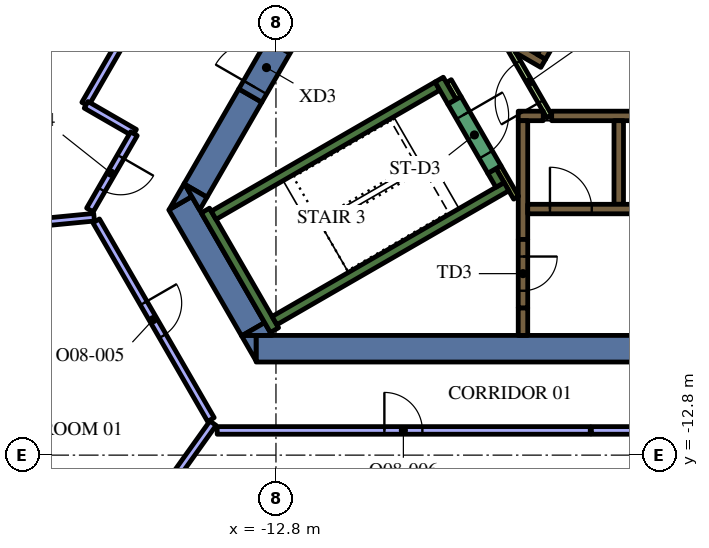
"""IFC4 building model, lengths in metres.
Left out: names, types, materials, properties, quantities, classifications, styles, units other than length and angle.
Written with IfcOpenShell. Run it as: python <this file> out.ifc"""

import sys

from ifc_helpers import new_model, si_unit, direction, frame, frame_2d, origin, place, context, subcontext, project, spatial, polyline, rectangle, outline, extrude, element, fill, save


model = new_model("IFC4")
c1 = context("Model", 3, precision=1e-05, world=origin(), true_north=direction((0.0, 1.0)))
c2 = subcontext(c1, "Body", "Model", "MODEL_VIEW")
j1 = project(units=[si_unit("LENGTHUNIT", "METRE"), si_unit("PLANEANGLEUNIT", "RADIAN")], contexts=[c1])
p1 = place(None, origin())
s1 = spatial("IfcSite", under=j1, at=p1, CompositionType="ELEMENT")
p2 = place(p1, origin())
s2 = spatial("IfcBuilding", under=s1, at=p2, CompositionType="ELEMENT")
p3 = place(p2, frame((0.0, 0.0, 235.2)))
s3 = spatial("IfcBuildingStorey", under=s2, at=p3, CompositionType="ELEMENT", Elevation=235.2)
p4 = place(p3, frame((8.904, -10.0, 0.0), z_axis=(0.0, 0.0, 1.0), x_axis=(-1.0, 0.0, 0.0)))
e1 = element("IfcWall", 1, at=p4, inside=s3, PredefinedType="SOLIDWALL", context=c2, shape_type="SweptSolid", body=[
    extrude(rectangle(XDim=22.226, YDim=0.7, at=frame_2d((11.113, 0.0))), origin(), (0.0, 0.0, 1.0), 4.2),
])
p5 = place(p3, origin())
e2 = element("IfcWall", 2, at=p5, inside=s3, PredefinedType="SOLIDWALL", context=c2, shape_type="SweptSolid", body=[
    extrude(outline(polyline([(-13.712, -9.65), (-13.324, -9.65), (-13.324, -10.322), (-13.712, -9.65)])), origin(), (0.0, 0.0, 1.0), 4.2),
])
p6 = place(p3, frame((-13.402, -9.487, 0.0), z_axis=(0.0, 0.0, 1.0), x_axis=(-0.500020498207, 0.866013568815, 0.0)))
e3 = element("IfcWall", 3, at=p6, inside=s3, PredefinedType="SOLIDWALL", context=c2, shape_type="SweptSolid", body=[
    extrude(rectangle(XDim=3.829, YDim=0.7, at=frame_2d((1.915, 0.0))), origin(), (0.0, 0.0, 1.0), 4.2),
])
e4 = element("IfcWall", 4, at=p5, inside=s3, PredefinedType="SOLIDWALL", context=c2, shape_type="SweptSolid", body=[
    extrude(outline(polyline([(-15.014, -5.995), (-15.611, -6.339), (-15.213, -5.65), (-15.014, -5.995)])), origin(), (0.0, 0.0, 1.0), 4.2),
])
e5 = element("IfcWall", 5, at=p5, inside=s3, PredefinedType="SOLIDWALL", context=c2, shape_type="SweptSolid", body=[
    extrude(outline(polyline([(-12.904, -9.65), (-13.68, -9.65), (-13.098, -9.314), (-12.904, -9.65)])), origin(), (0.0, 0.0, 1.0), 4.2),
])
p7 = place(p3, frame((-13.475, -3.339, 0.0), z_axis=(0.0, 0.0, 1.0), x_axis=(-0.499944726303, -0.866057313716, 0.0)))
e6 = element("IfcWall", 6, at=p7, inside=s3, PredefinedType="SOLIDWALL", context=c2, shape_type="SweptSolid", body=[
    extrude(rectangle(XDim=2.884, YDim=0.7, at=frame_2d((1.442, 0.0))), origin(), (0.0, 0.0, 1.0), 4.2),
])
e7 = element("IfcWall", 7, at=p5, inside=s3, PredefinedType="SOLIDWALL", context=c2, shape_type="SweptSolid", body=[
    extrude(outline(polyline([(-14.809, -6.35), (-15.197, -5.678), (-14.615, -6.014), (-14.809, -6.35)])), origin(), (0.0, 0.0, 1.0), 4.2),
])
p8 = place(p3, frame((-12.84, -9.511, 0.0), z_axis=(0.0, 0.0, 1.0), x_axis=(-0.499997733992, 0.866026712061, 0.0)))
e8 = element("IfcWall", 8, at=p8, inside=s3, PredefinedType="SOLIDWALL", context=c2, shape_type="SweptSolid", body=[
    extrude(rectangle(XDim=3.634, YDim=0.25, at=frame_2d((1.817, 0.0))), origin(), (0.0, 0.0, 1.0), 4.2),
])
p9 = place(p3, frame((-14.44, -6.49, 0.0), z_axis=(0.0, 0.0, 1.0), x_axis=(0.866022966069, 0.500004222222, 0.0)))
e9 = element("IfcWall", 9, at=p9, inside=s3, PredefinedType="SOLIDWALL", context=c2, shape_type="SweptSolid", body=[
    extrude(rectangle(XDim=6.8, YDim=0.25, at=frame_2d((3.4, 0.0))), origin(), (0.0, 0.0, 1.0), 4.2),
])
p10 = place(p3, frame((-8.168, -3.503, 0.0), z_axis=(0.0, 0.0, 1.0), x_axis=(-0.499952099219, 0.866053057547, 0.0)))
e10 = element("IfcWall", 10, at=p10, inside=s3, PredefinedType="SOLIDWALL", context=c2, shape_type="SweptSolid", body=[
    extrude(rectangle(XDim=0.675, YDim=0.25, at=frame_2d((0.337, 0.0))), origin(), (0.0, 0.0, 1.0), 4.2),
])
p11 = place(p3, frame((-12.84, -9.261, 0.0), z_axis=(0.0, 0.0, 1.0), x_axis=(0.866016039709, 0.500016218704, 0.0)))
e11 = element("IfcWall", 11, at=p11, inside=s3, PredefinedType="SOLIDWALL", context=c2, shape_type="SweptSolid", body=[
    extrude(rectangle(XDim=7.05, YDim=0.25, at=frame_2d((3.525, 0.0))), origin(), (0.0, 0.0, 1.0), 4.2),
])
p12 = place(p3, frame((-6.905, -5.69, 0.0), z_axis=(0.0, 0.0, 1.0), x_axis=(-0.500402024738, 0.865793170242, 0.0)))
e12 = element("IfcWall", 12, at=p12, inside=s3, PredefinedType="SOLIDWALL", context=c2, shape_type="SweptSolid", body=[
    extrude(rectangle(XDim=0.425, YDim=0.25, at=frame_2d((0.212, 0.0))), origin(), (0.0, 0.0, 1.0), 4.2),
])
p13 = place(p3, frame((-6.3, -8.925, 0.0), z_axis=(0.0, 0.0, 1.0), x_axis=(0.0, -1.0, 0.0)))
e13 = element("IfcWall", 13, at=p13, inside=s3, PredefinedType="SOLIDWALL", context=c2, shape_type="SweptSolid", body=[
    extrude(rectangle(XDim=0.725, YDim=0.25, at=frame_2d((0.363, 0.0))), origin(), (0.0, 0.0, 1.0), 4.2),
])
p14 = place(p3, frame((-5.545, -3.875, 0.0), z_axis=(0.0, 0.0, 1.0), x_axis=(1.0, 0.0, 0.0)))
e14 = element("IfcWall", 14, at=p14, inside=s3, PredefinedType="SOLIDWALL", context=c2, shape_type="SweptSolid", body=[
    extrude(rectangle(XDim=11.97, YDim=0.25, at=frame_2d((5.985, 0.0))), origin(), (0.0, 0.0, 1.0), 4.2),
])
p15 = place(p3, frame((-6.425, -3.875, 0.0), z_axis=(0.0, 0.0, 1.0), x_axis=(1.0, 0.0, 0.0)))
e15 = element("IfcWall", 15, at=p15, inside=s3, PredefinedType="SOLIDWALL", context=c2, shape_type="SweptSolid", body=[
    extrude(rectangle(XDim=0.658, YDim=0.25, at=frame_2d((0.329, 0.0))), origin(), (0.0, 0.0, 1.0), 4.2),
])
p16 = place(p3, frame((-3.78, -4.0, 0.0), z_axis=(0.0, 0.0, 1.0), x_axis=(0.0, -1.0, 0.0)))
e16 = element("IfcWall", 16, at=p16, inside=s3, PredefinedType="SOLIDWALL", context=c2, shape_type="SweptSolid", body=[
    extrude(rectangle(XDim=2.2, YDim=0.25, at=frame_2d((1.1, 0.0))), origin(), (0.0, 0.0, 1.0), 4.2),
])
p17 = place(p3, frame((-6.3, -7.125, 0.0), z_axis=(0.0, 0.0, 1.0), x_axis=(0.0, 1.0, 0.0)))
e17 = element("IfcWall", 17, at=p17, inside=s3, PredefinedType="SOLIDWALL", context=c2, shape_type="SweptSolid", body=[
    extrude(rectangle(XDim=3.125, YDim=0.25, at=frame_2d((1.562, 0.0))), origin(), (0.0, 0.0, 1.0), 4.2),
])
e18 = element("IfcWall", 18, at=p5, inside=s3, PredefinedType="SOLIDWALL", context=c2, shape_type="SweptSolid", body=[
    extrude(outline(polyline([(-5.922, -2.257), (-5.922, -2.257), (-5.705, -2.382), (-5.83, -2.598), (-6.483, -2.221), (-6.591, -2.033), (-6.591, -2.033), (-6.7, -2.096), (-7.952, -1.373), (-7.827, -1.156), (-5.922, -2.257)])), origin(), (0.0, 0.0, 1.0), 4.2),
])
p18 = place(p3, frame((-8.252, -2.958, 0.0), z_axis=(0.0, 0.0, 1.0), x_axis=(0.500174715838, -0.865924508047, 0.0)))
e19 = element("IfcWall", 19, at=p18, inside=s3, PredefinedType="PARTITIONING", context=c2, shape_type="SweptSolid", body=[
    extrude(rectangle(XDim=0.514, YDim=0.15, at=frame_2d((0.257, 0.0))), origin(), (0.0, 0.0, 1.0), 3.45),
])
p19 = place(p3, frame((-6.48, -6.027, 0.0), z_axis=(0.0, 0.0, 1.0), x_axis=(-0.499927229454, 0.866067413802, 0.0)))
e20 = element("IfcWall", 20, at=p19, inside=s3, PredefinedType="PARTITIONING", context=c2, shape_type="SweptSolid", body=[
    extrude(rectangle(XDim=0.929, YDim=0.15, at=frame_2d((0.464, 0.0))), origin(), (0.0, 0.0, 1.0), 4.2),
])
p20 = place(p3, frame((-6.175, -6.325, 0.0), z_axis=(0.0, 0.0, 1.0), x_axis=(1.0, 0.0, 0.0)))
e21 = element("IfcWall", 21, at=p20, inside=s3, PredefinedType="SOLIDWALL", context=c2, shape_type="SweptSolid", body=[
    extrude(rectangle(XDim=12.35, YDim=0.25, at=frame_2d((6.175, 0.0))), origin(), (0.0, 0.0, 1.0), 4.2),
])
p21 = place(p20, frame((0.585, 0.0, 0.0)))
e22 = element("IfcOpeningElement", 22, at=p21, cuts=e21, PredefinedType="OPENING", context=c2, shape_type="SweptSolid", body=[
    extrude(rectangle(XDim=1.1, YDim=2.1, at=frame_2d((0.55, 1.05))), frame((0.0, 0.135, 0.0), z_axis=(0.0, -1.0, 0.0), x_axis=(1.0, 0.0, 0.0)), (0.0, 0.0, 1.0), 0.27),
])
p22 = place(p20, frame((3.105, 0.0, 0.0)))
e23 = element("IfcOpeningElement", 23, at=p22, cuts=e21, PredefinedType="OPENING", context=c2, shape_type="SweptSolid", body=[
    extrude(rectangle(XDim=1.1, YDim=2.1, at=frame_2d((0.55, 1.05))), frame((0.0, 0.135, 0.0), z_axis=(0.0, -1.0, 0.0), x_axis=(1.0, 0.0, 0.0)), (0.0, 0.0, 1.0), 0.27),
])
p23 = place(p20, frame((5.625, 0.0, 0.0)))
e24 = element("IfcOpeningElement", 24, at=p23, cuts=e21, PredefinedType="OPENING", context=c2, shape_type="SweptSolid", body=[
    extrude(rectangle(XDim=1.1, YDim=2.1, at=frame_2d((0.55, 1.05))), frame((0.0, 0.135, 0.0), z_axis=(0.0, -1.0, 0.0), x_axis=(1.0, 0.0, 0.0)), (0.0, 0.0, 1.0), 0.27),
])
p24 = place(p20, frame((8.145, 0.0, 0.0)))
e25 = element("IfcOpeningElement", 25, at=p24, cuts=e21, PredefinedType="OPENING", context=c2, shape_type="SweptSolid", body=[
    extrude(rectangle(XDim=1.1, YDim=2.1, at=frame_2d((0.55, 1.05))), frame((0.0, 0.135, 0.0), z_axis=(0.0, -1.0, 0.0), x_axis=(1.0, 0.0, 0.0)), (0.0, 0.0, 1.0), 0.27),
])
p25 = place(p20, frame((10.665, 0.0, 0.0)))
e26 = element("IfcOpeningElement", 26, at=p25, cuts=e21, PredefinedType="OPENING", context=c2, shape_type="SweptSolid", body=[
    extrude(rectangle(XDim=1.1, YDim=2.1, at=frame_2d((0.55, 1.05))), frame((0.0, 0.135, 0.0), z_axis=(0.0, -1.0, 0.0), x_axis=(1.0, 0.0, 0.0)), (0.0, 0.0, 1.0), 0.27),
])
p26 = place(p3, frame((-0.898, 6.194, 0.0), z_axis=(0.0, 0.0, 1.0), x_axis=(-0.499996202215, -0.866027596426, 0.0)))
e27 = element("IfcWall", 27, at=p26, inside=s3, PredefinedType="SOLIDWALL", context=c2, shape_type="SweptSolid", body=[
    extrude(rectangle(XDim=9.83, YDim=0.25, at=frame_2d((4.915, 0.0))), origin(), (0.0, 0.0, 1.0), 4.2),
])
p27 = place(p26, frame((0.585, 0.0, 0.0)))
e28 = element("IfcOpeningElement", 28, at=p27, cuts=e27, PredefinedType="OPENING", context=c2, shape_type="SweptSolid", body=[
    extrude(rectangle(XDim=1.1, YDim=2.1, at=frame_2d((0.55, 1.05))), frame((0.0, 0.135, 0.0), z_axis=(0.0, -1.0, 0.0), x_axis=(1.0, 0.0, 0.0)), (0.0, 0.0, 1.0), 0.27),
])
p28 = place(p26, frame((3.105, 0.0, 0.0)))
e29 = element("IfcOpeningElement", 29, at=p28, cuts=e27, PredefinedType="OPENING", context=c2, shape_type="SweptSolid", body=[
    extrude(rectangle(XDim=1.1, YDim=2.1, at=frame_2d((0.55, 1.05))), frame((0.0, 0.135, 0.0), z_axis=(0.0, -1.0, 0.0), x_axis=(1.0, 0.0, 0.0)), (0.0, 0.0, 1.0), 0.27),
])
p29 = place(p26, frame((5.625, 0.0, 0.0)))
e30 = element("IfcOpeningElement", 30, at=p29, cuts=e27, PredefinedType="OPENING", context=c2, shape_type="SweptSolid", body=[
    extrude(rectangle(XDim=1.1, YDim=2.1, at=frame_2d((0.55, 1.05))), frame((0.0, 0.135, 0.0), z_axis=(0.0, -1.0, 0.0), x_axis=(1.0, 0.0, 0.0)), (0.0, 0.0, 1.0), 0.27),
])
p30 = place(p26, frame((8.145, 0.0, 0.0)))
e31 = element("IfcOpeningElement", 31, at=p30, cuts=e27, PredefinedType="OPENING", context=c2, shape_type="SweptSolid", body=[
    extrude(rectangle(XDim=1.1, YDim=2.1, at=frame_2d((0.55, 1.05))), frame((0.0, 0.135, 0.0), z_axis=(0.0, -1.0, 0.0), x_axis=(1.0, 0.0, 0.0)), (0.0, 0.0, 1.0), 0.27),
])
p31 = place(p3, frame((-8.103, -3.466, 0.0), z_axis=(0.0, 0.0, 1.0), x_axis=(0.500078061341, -0.865980330357, 0.0)))
e32 = element("IfcWall", 32, at=p31, inside=s3, PredefinedType="SOLIDWALL", context=c2, shape_type="SweptSolid", body=[
    extrude(rectangle(XDim=2.1, YDim=0.4, at=frame_2d((1.05, 0.0))), origin(), (0.0, 0.0, 1.0), 4.2),
])
p32 = place(p31, frame((0.45, 0.0, 0.0)))
e33 = element("IfcOpeningElement", 33, at=p32, cuts=e32, PredefinedType="OPENING", context=c2, shape_type="SweptSolid", body=[
    extrude(rectangle(XDim=1.2, YDim=2.1, at=frame_2d((0.6, 1.05))), frame((0.0, 0.21, 0.0), z_axis=(0.0, -1.0, 0.0), x_axis=(1.0, 0.0, 0.0)), (0.0, 0.0, 1.0), 0.42),
])
p33 = place(p3, frame((-6.3, -7.125, 0.0), z_axis=(0.0, 0.0, 1.0), x_axis=(0.0, -1.0, 0.0)))
e34 = element("IfcWall", 34, at=p33, inside=s3, PredefinedType="SOLIDWALL", context=c2, shape_type="SweptSolid", body=[
    extrude(rectangle(XDim=1.8, YDim=0.25, at=frame_2d((0.9, 0.0))), origin(), (0.0, 0.0, 1.0), 4.2),
])
p34 = place(p33, frame((0.45, 0.0, 0.0)))
e35 = element("IfcOpeningElement", 35, at=p34, cuts=e34, PredefinedType="OPENING", context=c2, shape_type="SweptSolid", body=[
    extrude(rectangle(XDim=0.9, YDim=2.1, at=frame_2d((0.45, 1.05))), frame((0.0, 0.135, 0.0), z_axis=(0.0, -1.0, 0.0), x_axis=(1.0, 0.0, 0.0)), (0.0, 0.0, 1.0), 0.27),
])
p35 = place(p3, frame((-5.606, -3.89, 0.0), z_axis=(0.0, 0.0, 1.0), x_axis=(-0.500027713859, 0.866009402589, 0.0)))
e36 = element("IfcWall", 36, at=p35, inside=s3, PredefinedType="PARTITIONING", context=c2, shape_type="SweptSolid", body=[
    extrude(rectangle(XDim=2.1, YDim=0.15, at=frame_2d((1.05, 0.0))), origin(), (0.0, 0.0, 1.0), 3.45),
])
p36 = place(p35, frame((0.45, 0.0, 0.0)))
e37 = element("IfcOpeningElement", 37, at=p36, cuts=e36, PredefinedType="OPENING", context=c2, shape_type="SweptSolid", body=[
    extrude(rectangle(XDim=1.2, YDim=2.1, at=frame_2d((0.6, 1.05))), frame((0.0, 0.085, 0.0), z_axis=(0.0, -1.0, 0.0), x_axis=(1.0, 0.0, 0.0)), (0.0, 0.0, 1.0), 0.17),
])
p37 = place(p3, frame((-13.475, -3.339, 0.0), z_axis=(0.0, 0.0, 1.0), x_axis=(0.499954529098, 0.86605165483, 0.0)))
e38 = element("IfcWall", 38, at=p37, inside=s3, PredefinedType="SOLIDWALL", context=c2, shape_type="SweptSolid", body=[
    extrude(rectangle(XDim=1.7, YDim=0.7, at=frame_2d((0.85, 0.0))), origin(), (0.0, 0.0, 1.0), 4.2),
])
p38 = place(p37, frame((0.25, 0.0, 0.0)))
e39 = element("IfcOpeningElement", 39, at=p38, cuts=e38, PredefinedType="OPENING", context=c2, shape_type="SweptSolid", body=[
    extrude(rectangle(XDim=1.2, YDim=2.1, at=frame_2d((0.6, 1.05))), frame((0.0, 0.36, 0.0), z_axis=(0.0, -1.0, 0.0), x_axis=(1.0, 0.0, 0.0)), (0.0, 0.0, 1.0), 0.72),
])
p39 = place(p3, frame((-17.586, -6.54, 0.0), z_axis=(0.0, 0.0, 1.0), x_axis=(-0.995357542522, -0.096246363795, 0.0)))
e40 = element("IfcWall", 40, at=p39, inside=s3, PredefinedType="PARTITIONING", context=c2, shape_type="SweptSolid", body=[
    extrude(rectangle(XDim=7.318, YDim=0.2, at=frame_2d((3.659, 0.0))), origin(), (0.0, 0.0, 1.0), 3.45),
])
p40 = place(p3, frame((-16.681, -1.593, 0.0), z_axis=(0.0, 0.0, 1.0), x_axis=(-0.499985038317, -0.866034041744, 0.0)))
e41 = element("IfcWall", 41, at=p40, inside=s3, PredefinedType="PARTITIONING", context=c2, shape_type="SweptSolid", body=[
    extrude(rectangle(XDim=2.28, YDim=0.2, at=frame_2d((1.14, 0.0))), origin(), (0.0, 0.0, 1.0), 3.45),
])
p41 = place(p3, frame((-17.795, -3.582, 0.0), z_axis=(0.0, 0.0, 1.0), x_axis=(0.866016893711, -0.50001473959, 0.0)))
e42 = element("IfcWall", 42, at=p41, inside=s3, PredefinedType="PARTITIONING", context=c2, shape_type="SweptSolid", body=[
    extrude(rectangle(XDim=1.47, YDim=0.2, at=frame_2d((0.735, 0.0))), origin(), (0.0, 0.0, 1.0), 3.45),
])
p42 = place(p3, frame((-16.537, -4.343, 0.0), z_axis=(0.0, 0.0, 1.0), x_axis=(-0.500014285048, -0.866017156151, 0.0)))
e43 = element("IfcWall", 43, at=p42, inside=s3, PredefinedType="PARTITIONING", context=c2, shape_type="SweptSolid", body=[
    extrude(rectangle(XDim=2.317, YDim=0.2, at=frame_2d((1.159, 0.0))), origin(), (0.0, 0.0, 1.0), 3.45),
])
p43 = place(p42, frame((0.7, 0.0, 0.0)))
e44 = element("IfcOpeningElement", 44, at=p43, cuts=e43, PredefinedType="OPENING", context=c2, shape_type="SweptSolid", body=[
    extrude(rectangle(XDim=1.0, YDim=2.1, at=frame_2d((0.5, 1.05))), frame((0.0, 0.11, 0.0), z_axis=(0.0, -1.0, 0.0), x_axis=(1.0, 0.0, 0.0)), (0.0, 0.0, 1.0), 0.22),
])
p44 = place(p3, frame((-14.457, -11.96, 0.0), z_axis=(0.0, 0.0, 1.0), x_axis=(-0.581023578026, -0.813886725397, 0.0)))
e45 = element("IfcWall", 45, at=p44, inside=s3, PredefinedType="PARTITIONING", context=c2, shape_type="SweptSolid", body=[
    extrude(rectangle(XDim=7.318, YDim=0.2, at=frame_2d((3.659, 0.0))), origin(), (0.0, 0.0, 1.0), 3.45),
])
p45 = place(p3, frame((-17.531, -6.635, 0.0), z_axis=(0.0, 0.0, 1.0), x_axis=(0.500009459589, -0.866019942219, 0.0)))
e46 = element("IfcWall", 46, at=p45, inside=s3, PredefinedType="PARTITIONING", context=c2, shape_type="SweptSolid", body=[
    extrude(rectangle(XDim=6.038, YDim=0.2, at=frame_2d((3.019, 0.0))), origin(), (0.0, 0.0, 1.0), 3.45),
])
p46 = place(p45, frame((2.5, 0.0, 0.0)))
e47 = element("IfcOpeningElement", 47, at=p46, cuts=e46, PredefinedType="OPENING", context=c2, shape_type="SweptSolid", body=[
    extrude(rectangle(XDim=1.0, YDim=2.1, at=frame_2d((0.5, 1.05))), frame((0.0, 0.11, 0.0), z_axis=(0.0, -1.0, 0.0), x_axis=(1.0, 0.0, 0.0)), (0.0, 0.0, 1.0), 0.22),
])
p47 = place(p3, frame((-4.5, -12.15, 0.0), z_axis=(0.0, 0.0, 1.0), x_axis=(1.0, 0.0, 0.0)))
e48 = element("IfcWall", 48, at=p47, inside=s3, PredefinedType="PARTITIONING", context=c2, shape_type="SweptSolid", body=[
    extrude(rectangle(XDim=9.0, YDim=0.2, at=frame_2d((4.5, 0.0))), origin(), (0.0, 0.0, 1.0), 3.45),
])
p48 = place(p3, frame((-14.347, -12.15, 0.0), z_axis=(0.0, 0.0, 1.0), x_axis=(1.0, 0.0, 0.0)))
e49 = element("IfcWall", 49, at=p48, inside=s3, PredefinedType="PARTITIONING", context=c2, shape_type="SweptSolid", body=[
    extrude(rectangle(XDim=9.817, YDim=0.2, at=frame_2d((4.909, 0.0))), origin(), (0.0, 0.0, 1.0), 3.45),
])
p49 = place(p48, frame((4.4, 0.0, 0.0)))
e50 = element("IfcOpeningElement", 50, at=p49, cuts=e49, PredefinedType="OPENING", context=c2, shape_type="SweptSolid", body=[
    extrude(rectangle(XDim=1.0, YDim=2.1, at=frame_2d((0.5, 1.05))), frame((0.0, 0.11, 0.0), z_axis=(0.0, -1.0, 0.0), x_axis=(1.0, 0.0, 0.0)), (0.0, 0.0, 1.0), 0.22),
])
p50 = place(p21, origin())
e51 = element("IfcDoor", 51, at=p50, inside=s3, OperationType="DOUBLE_DOOR_SLIDING", PredefinedType="DOOR", context=c2, shape_type="SweptSolid", body=[
    extrude(rectangle(XDim=1.1, YDim=2.1, at=frame_2d((0.55, 1.05))), frame((0.0, 0.025, 0.0), z_axis=(0.0, -1.0, 0.0), x_axis=(1.0, 0.0, 0.0)), (0.0, 0.0, 1.0), 0.05),
])
fill(e22, e51)
p51 = place(p32, origin())
e52 = element("IfcDoor", 52, at=p51, inside=s3, OperationType="SINGLE_SWING_LEFT", PredefinedType="DOOR", context=c2, shape_type="SweptSolid", body=[
    extrude(rectangle(XDim=1.2, YDim=2.1, at=frame_2d((0.6, 1.05))), frame((0.0, 0.025, 0.0), z_axis=(0.0, -1.0, 0.0), x_axis=(1.0, 0.0, 0.0)), (0.0, 0.0, 1.0), 0.05),
])
fill(e33, e52)
p52 = place(p34, origin())
e53 = element("IfcDoor", 53, at=p52, inside=s3, OperationType="SINGLE_SWING_LEFT", PredefinedType="DOOR", context=c2, shape_type="SweptSolid", body=[
    extrude(rectangle(XDim=0.9, YDim=2.1, at=frame_2d((0.45, 1.05))), frame((0.0, 0.025, 0.0), z_axis=(0.0, -1.0, 0.0), x_axis=(1.0, 0.0, 0.0)), (0.0, 0.0, 1.0), 0.05),
])
fill(e35, e53)
p53 = place(p36, origin())
e54 = element("IfcDoor", 54, at=p53, inside=s3, OperationType="SINGLE_SWING_LEFT", PredefinedType="DOOR", context=c2, shape_type="SweptSolid", body=[
    extrude(rectangle(XDim=1.2, YDim=2.1, at=frame_2d((0.6, 1.05))), frame((0.0, 0.025, 0.0), z_axis=(0.0, -1.0, 0.0), x_axis=(1.0, 0.0, 0.0)), (0.0, 0.0, 1.0), 0.05),
])
fill(e37, e54)
p54 = place(p38, origin())
e55 = element("IfcDoor", 55, at=p54, inside=s3, OperationType="SINGLE_SWING_LEFT", PredefinedType="DOOR", context=c2, shape_type="SweptSolid", body=[
    extrude(rectangle(XDim=1.2, YDim=2.1, at=frame_2d((0.6, 1.05))), frame((0.0, 0.025, 0.0), z_axis=(0.0, -1.0, 0.0), x_axis=(1.0, 0.0, 0.0)), (0.0, 0.0, 1.0), 0.05),
])
fill(e39, e55)
p55 = place(p43, origin())
e56 = element("IfcDoor", 56, at=p55, inside=s3, OperationType="SINGLE_SWING_RIGHT", PredefinedType="DOOR", context=c2, shape_type="SweptSolid", body=[
    extrude(rectangle(XDim=1.0, YDim=2.1, at=frame_2d((0.5, 1.05))), frame((0.0, 0.025, 0.0), z_axis=(0.0, -1.0, 0.0), x_axis=(1.0, 0.0, 0.0)), (0.0, 0.0, 1.0), 0.05),
])
fill(e44, e56)
p56 = place(p46, origin())
e57 = element("IfcDoor", 57, at=p56, inside=s3, OperationType="SINGLE_SWING_LEFT", PredefinedType="DOOR", context=c2, shape_type="SweptSolid", body=[
    extrude(rectangle(XDim=1.0, YDim=2.1, at=frame_2d((0.5, 1.05))), frame((0.0, 0.025, 0.0), z_axis=(0.0, -1.0, 0.0), x_axis=(1.0, 0.0, 0.0)), (0.0, 0.0, 1.0), 0.05),
])
fill(e47, e57)
p57 = place(p49, origin())
e58 = element("IfcDoor", 58, at=p57, inside=s3, OperationType="SINGLE_SWING_LEFT", PredefinedType="DOOR", context=c2, shape_type="SweptSolid", body=[
    extrude(rectangle(XDim=1.0, YDim=2.1, at=frame_2d((0.5, 1.05))), frame((0.0, 0.025, 0.0), z_axis=(0.0, -1.0, 0.0), x_axis=(1.0, 0.0, 0.0)), (0.0, 0.0, 1.0), 0.05),
])
fill(e50, e58)
save(model, sys.argv[1])
